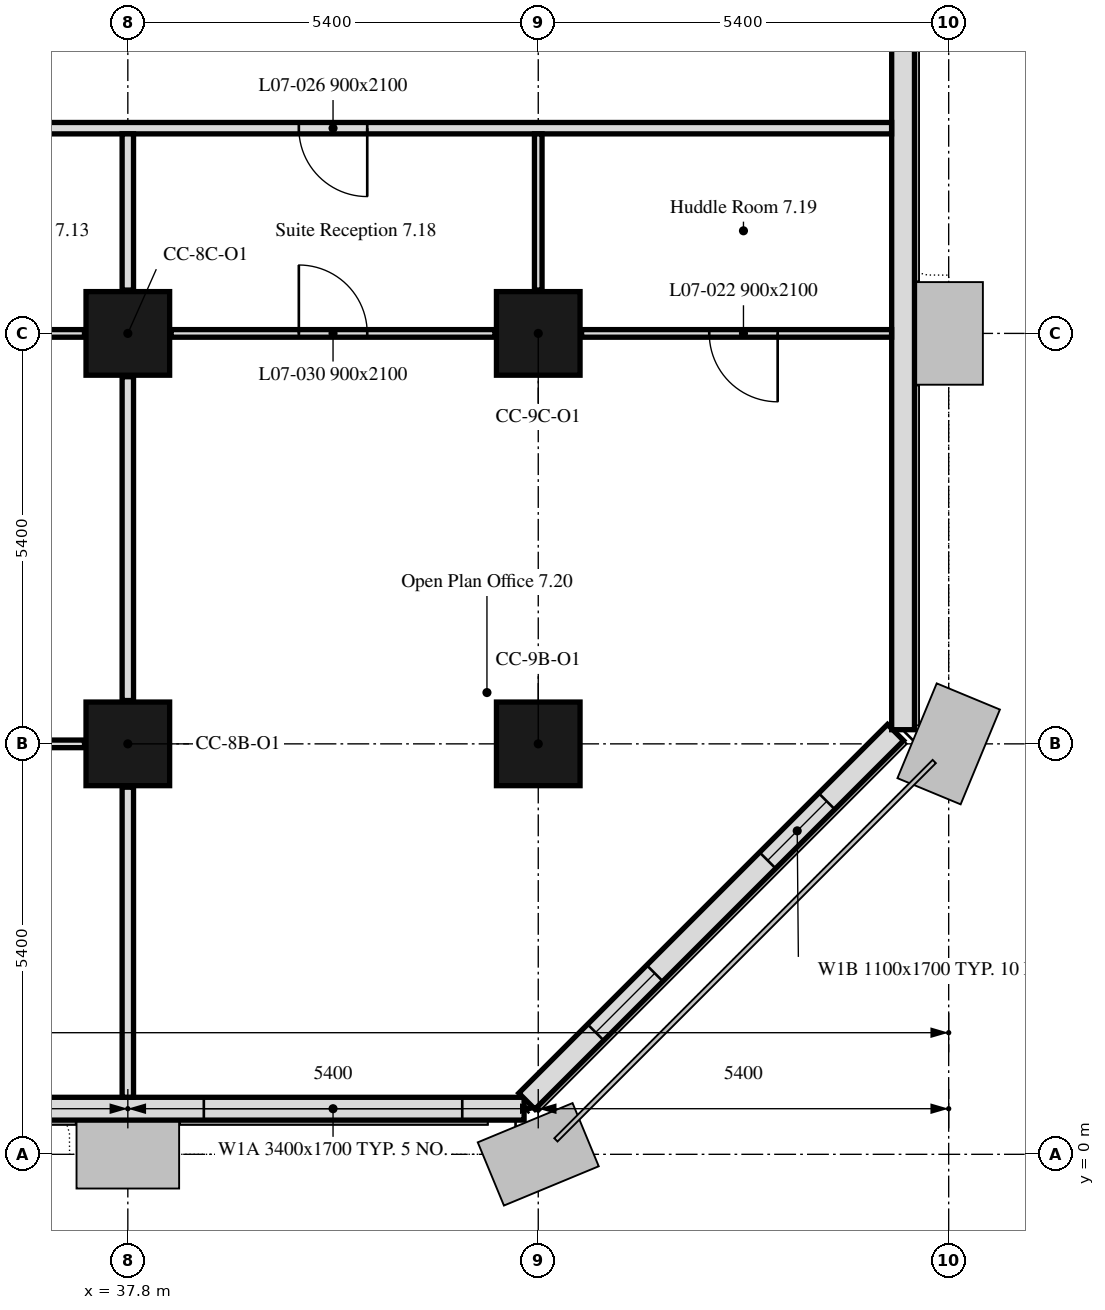
"""IFC4 building model, lengths in metres.
Left out: names, types, materials, properties, quantities, classifications, styles, units other than length and angle.
Written with IfcOpenShell. Run it as: python <this file> out.ifc"""

import sys

from ifc_helpers import new_model, si_unit, direction, frame, frame_2d, origin, origin_2d, place, context, subcontext, project, spatial, rectangle, extrude, element, fill, save


model = new_model("IFC4")
c1 = context("Model", 3, precision=1e-05, world=origin(), true_north=direction((0.0, 1.0)))
c2 = subcontext(c1, "Body", "Model", "MODEL_VIEW")
j1 = project(units=[si_unit("LENGTHUNIT", "METRE"), si_unit("PLANEANGLEUNIT", "RADIAN")], contexts=[c1])
p1 = place(None, origin())
s1 = spatial("IfcSite", under=j1, at=p1, CompositionType="ELEMENT")
p2 = place(p1, origin())
s2 = spatial("IfcBuilding", under=s1, at=p2, CompositionType="ELEMENT")
p3 = place(p2, frame((0.0, 0.0, 37.4)))
s3 = spatial("IfcBuildingStorey", under=s2, at=p3, CompositionType="ELEMENT", Elevation=37.4)
for number, where, z_axis, x_axis in (
    (1, (37.8, 5.4, 0.0), (0.0, 0.0, 1.0), (1.0, 0.0, 0.0)),
    (2, (43.2, 5.4, 0.0), (0.0, 0.0, 1.0), (1.0, 0.0, 0.0)),
    (3, (37.8, 10.8, 0.0), (0.0, 0.0, 1.0), (1.0, 0.0, 0.0)),
    (4, (43.2, 10.8, 0.0), (0.0, 0.0, 1.0), (1.0, 0.0, 0.0)),
):
    element("IfcColumn", number, at=place(p3, frame(where, z_axis=z_axis, x_axis=x_axis)), inside=s3, PredefinedType="COLUMN", context=c2, shape_type="SweptSolid", body=[
        extrude(rectangle(XDim=1.1, YDim=1.1, at=origin_2d()), origin(), (0.0, 0.0, 1.0), 3.5),
    ])
p4 = place(p3, frame((10.986, 0.6, 0.0), z_axis=(0.0, 0.0, 1.0), x_axis=(1.0, 0.0, 0.0)))
e5 = element("IfcWall", 5, at=p4, inside=s3, PredefinedType="SOLIDWALL", context=c2, shape_type="SweptSolid", body=[
    extrude(rectangle(XDim=32.027, YDim=0.3, at=frame_2d((16.014, 0.0))), origin(), (0.0, 0.0, 1.0), 3.5),
])
p5 = place(p4, frame((27.814, 0.0, 0.9)))
e6 = element("IfcOpeningElement", 6, at=p5, cuts=e5, PredefinedType="OPENING", context=c2, shape_type="SweptSolid", body=[
    extrude(rectangle(XDim=3.4, YDim=1.7, at=frame_2d((1.7, 0.85))), frame((0.0, 0.16, 0.0), z_axis=(0.0, -1.0, 0.0), x_axis=(1.0, 0.0, 0.0)), (0.0, 0.0, 1.0), 0.32),
])
p6 = place(p3, frame((43.051, 0.699, 0.0), z_axis=(0.0, 0.0, 1.0), x_axis=(0.707106781187, 0.707106781187, 0.0)))
e7 = element("IfcWall", 7, at=p6, inside=s3, PredefinedType="SOLIDWALL", context=c2, shape_type="SweptSolid", body=[
    extrude(rectangle(XDim=6.86, YDim=0.3, at=frame_2d((3.43, 0.0))), origin(), (0.0, 0.0, 1.0), 3.5),
])
p7 = place(p6, frame((1.28, 0.0, 0.9)))
e8 = element("IfcOpeningElement", 8, at=p7, cuts=e7, PredefinedType="OPENING", context=c2, shape_type="SweptSolid", body=[
    extrude(rectangle(XDim=1.1, YDim=1.7, at=frame_2d((0.55, 0.85))), frame((0.0, 0.16, 0.0), z_axis=(0.0, -1.0, 0.0), x_axis=(1.0, 0.0, 0.0)), (0.0, 0.0, 1.0), 0.32),
])
p8 = place(p6, frame((4.48, 0.0, 0.9)))
e9 = element("IfcOpeningElement", 9, at=p8, cuts=e7, PredefinedType="OPENING", context=c2, shape_type="SweptSolid", body=[
    extrude(rectangle(XDim=1.1, YDim=1.7, at=frame_2d((0.55, 0.85))), frame((0.0, 0.16, 0.0), z_axis=(0.0, -1.0, 0.0), x_axis=(1.0, 0.0, 0.0)), (0.0, 0.0, 1.0), 0.32),
])
p9 = place(p3, frame((48.0, 5.586, 0.0), z_axis=(0.0, 0.0, 1.0), x_axis=(0.0, 1.0, 0.0)))
e10 = element("IfcWall", 10, at=p9, inside=s3, PredefinedType="SOLIDWALL", context=c2, shape_type="SweptSolid", body=[
    extrude(rectangle(XDim=32.027, YDim=0.3, at=frame_2d((16.014, 0.0))), origin(), (0.0, 0.0, 1.0), 3.5),
])
p10 = place(p9, frame((28.164, 0.0, 0.9)))
e11 = element("IfcOpeningElement", 11, at=p10, cuts=e10, PredefinedType="OPENING", context=c2, shape_type="SweptSolid", body=[
    extrude(rectangle(XDim=1.1, YDim=1.7, at=frame_2d((0.55, 0.85))), frame((0.0, 0.16, 0.0), z_axis=(0.0, -1.0, 0.0), x_axis=(1.0, 0.0, 0.0)), (0.0, 0.0, 1.0), 0.32),
])
p11 = place(p9, frame((29.764, 0.0, 0.9)))
e12 = element("IfcOpeningElement", 12, at=p11, cuts=e10, PredefinedType="OPENING", context=c2, shape_type="SweptSolid", body=[
    extrude(rectangle(XDim=1.1, YDim=1.7, at=frame_2d((0.55, 0.85))), frame((0.0, 0.16, 0.0), z_axis=(0.0, -1.0, 0.0), x_axis=(1.0, 0.0, 0.0)), (0.0, 0.0, 1.0), 0.32),
])
p12 = place(p3, frame((47.849, 13.5, 0.0), z_axis=(0.0, 0.0, 1.0), x_axis=(-1.0, 0.0, 0.0)))
e13 = element("IfcWall", 13, at=p12, inside=s3, PredefinedType="PARTITIONING", context=c2, shape_type="SweptSolid", body=[
    extrude(rectangle(XDim=41.698, YDim=0.15, at=frame_2d((20.849, 0.0))), origin(), (0.0, 0.0, 1.0), 2.75),
])
p13 = place(p12, frame((29.119, 0.0, 0.0)))
e14 = element("IfcOpeningElement", 14, at=p13, cuts=e13, PredefinedType="OPENING", context=c2, shape_type="SweptSolid", body=[
    extrude(rectangle(XDim=0.9, YDim=2.1, at=frame_2d((0.45, 1.05))), frame((0.0, 0.075, 0.0), z_axis=(0.0, -1.0, 0.0), x_axis=(1.0, 0.0, 0.0)), (0.0, 0.0, 1.0), 0.15),
])
p14 = place(p12, frame((27.879, 0.0, 0.0)))
e15 = element("IfcOpeningElement", 15, at=p14, cuts=e13, PredefinedType="OPENING", context=c2, shape_type="SweptSolid", body=[
    extrude(rectangle(XDim=0.9, YDim=2.1, at=frame_2d((0.45, 1.05))), frame((0.0, 0.075, 0.0), z_axis=(0.0, -1.0, 0.0), x_axis=(1.0, 0.0, 0.0)), (0.0, 0.0, 1.0), 0.15),
])
p15 = place(p12, frame((18.319, 0.0, 0.0)))
e16 = element("IfcOpeningElement", 16, at=p15, cuts=e13, PredefinedType="OPENING", context=c2, shape_type="SweptSolid", body=[
    extrude(rectangle(XDim=0.9, YDim=2.1, at=frame_2d((0.45, 1.05))), frame((0.0, 0.075, 0.0), z_axis=(0.0, -1.0, 0.0), x_axis=(1.0, 0.0, 0.0)), (0.0, 0.0, 1.0), 0.15),
])
p16 = place(p12, frame((11.679, 0.0, 0.0)))
e17 = element("IfcOpeningElement", 17, at=p16, cuts=e13, PredefinedType="OPENING", context=c2, shape_type="SweptSolid", body=[
    extrude(rectangle(XDim=0.9, YDim=2.1, at=frame_2d((0.45, 1.05))), frame((0.0, 0.075, 0.0), z_axis=(0.0, -1.0, 0.0), x_axis=(1.0, 0.0, 0.0)), (0.0, 0.0, 1.0), 0.15),
])
p17 = place(p12, frame((38.624, 0.0, 0.0)))
e18 = element("IfcOpeningElement", 18, at=p17, cuts=e13, PredefinedType="OPENING", context=c2, shape_type="SweptSolid", body=[
    extrude(rectangle(XDim=0.9, YDim=2.1, at=frame_2d((0.45, 1.05))), frame((0.0, 0.075, 0.0), z_axis=(0.0, -1.0, 0.0), x_axis=(1.0, 0.0, 0.0)), (0.0, 0.0, 1.0), 0.15),
])
p18 = place(p12, frame((23.099, 0.0, 0.0)))
e19 = element("IfcOpeningElement", 19, at=p18, cuts=e13, PredefinedType="OPENING", context=c2, shape_type="SweptSolid", body=[
    extrude(rectangle(XDim=0.9, YDim=2.1, at=frame_2d((0.45, 1.05))), frame((0.0, 0.075, 0.0), z_axis=(0.0, -1.0, 0.0), x_axis=(1.0, 0.0, 0.0)), (0.0, 0.0, 1.0), 0.15),
])
p19 = place(p12, frame((6.899, 0.0, 0.0)))
e20 = element("IfcOpeningElement", 20, at=p19, cuts=e13, PredefinedType="OPENING", context=c2, shape_type="SweptSolid", body=[
    extrude(rectangle(XDim=0.9, YDim=2.1, at=frame_2d((0.45, 1.05))), frame((0.0, 0.075, 0.0), z_axis=(0.0, -1.0, 0.0), x_axis=(1.0, 0.0, 0.0)), (0.0, 0.0, 1.0), 0.15),
])
p20 = place(p3, frame((32.97, 10.8, 0.0), z_axis=(0.0, 0.0, 1.0), x_axis=(1.0, 0.0, 0.0)))
e21 = element("IfcWall", 21, at=p20, inside=s3, PredefinedType="PARTITIONING", context=c2, shape_type="SweptSolid", body=[
    extrude(rectangle(XDim=4.26, YDim=0.1, at=frame_2d((2.13, 0.0))), origin(), (0.0, 0.0, 1.0), 2.75),
])
p21 = place(p20, frame((1.06, 0.0, 0.0)))
e22 = element("IfcOpeningElement", 22, at=p21, cuts=e21, PredefinedType="OPENING", context=c2, shape_type="SweptSolid", body=[
    extrude(rectangle(XDim=0.9, YDim=2.1, at=frame_2d((0.45, 1.05))), frame((0.0, 0.05, 0.0), z_axis=(0.0, -1.0, 0.0), x_axis=(1.0, 0.0, 0.0)), (0.0, 0.0, 1.0), 0.1),
])
p22 = place(p3, frame((37.8, 11.37, 0.0), z_axis=(0.0, 0.0, 1.0), x_axis=(0.0, 1.0, 0.0)))
e23 = element("IfcWall", 23, at=p22, inside=s3, PredefinedType="PARTITIONING", context=c2, shape_type="SweptSolid", body=[
    extrude(rectangle(XDim=2.055, YDim=0.15, at=frame_2d((1.027, 0.0))), origin(), (0.0, 0.0, 1.0), 2.75),
])
p23 = place(p3, frame((32.97, 5.4, 0.0), z_axis=(0.0, 0.0, 1.0), x_axis=(1.0, 0.0, 0.0)))
e24 = element("IfcWall", 24, at=p23, inside=s3, PredefinedType="PARTITIONING", context=c2, shape_type="SweptSolid", body=[
    extrude(rectangle(XDim=4.26, YDim=0.1, at=frame_2d((2.13, 0.0))), origin(), (0.0, 0.0, 1.0), 3.5),
])
p24 = place(p23, frame((1.68, 0.0, 0.0)))
e25 = element("IfcOpeningElement", 25, at=p24, cuts=e24, PredefinedType="OPENING", context=c2, shape_type="SweptSolid", body=[
    extrude(rectangle(XDim=0.9, YDim=2.1, at=frame_2d((0.45, 1.05))), frame((0.0, 0.05, 0.0), z_axis=(0.0, -1.0, 0.0), x_axis=(1.0, 0.0, 0.0)), (0.0, 0.0, 1.0), 0.1),
])
p25 = place(p3, frame((37.8, 5.97, 0.0), z_axis=(0.0, 0.0, 1.0), x_axis=(0.0, 1.0, 0.0)))
e26 = element("IfcWall", 26, at=p25, inside=s3, PredefinedType="PARTITIONING", context=c2, shape_type="SweptSolid", body=[
    extrude(rectangle(XDim=4.26, YDim=0.15, at=frame_2d((2.13, 0.0))), origin(), (0.0, 0.0, 1.0), 2.75),
])
p26 = place(p3, frame((37.8, 4.83, 0.0), z_axis=(0.0, 0.0, 1.0), x_axis=(0.0, -1.0, 0.0)))
e27 = element("IfcWall", 27, at=p26, inside=s3, PredefinedType="PARTITIONING", context=c2, shape_type="SweptSolid", body=[
    extrude(rectangle(XDim=4.079, YDim=0.15, at=frame_2d((2.04, 0.0))), origin(), (0.0, 0.0, 1.0), 2.75),
])
p27 = place(p3, frame((38.37, 10.8, 0.0), z_axis=(0.0, 0.0, 1.0), x_axis=(1.0, 0.0, 0.0)))
e28 = element("IfcWall", 28, at=p27, inside=s3, PredefinedType="PARTITIONING", context=c2, shape_type="SweptSolid", body=[
    extrude(rectangle(XDim=4.26, YDim=0.1, at=frame_2d((2.13, 0.0))), origin(), (0.0, 0.0, 1.0), 2.75),
])
p28 = place(p27, frame((1.68, 0.0, 0.0)))
e29 = element("IfcOpeningElement", 29, at=p28, cuts=e28, PredefinedType="OPENING", context=c2, shape_type="SweptSolid", body=[
    extrude(rectangle(XDim=0.9, YDim=2.1, at=frame_2d((0.45, 1.05))), frame((0.0, 0.05, 0.0), z_axis=(0.0, -1.0, 0.0), x_axis=(1.0, 0.0, 0.0)), (0.0, 0.0, 1.0), 0.1),
])
p29 = place(p3, frame((43.2, 11.37, 0.0), z_axis=(0.0, 0.0, 1.0), x_axis=(0.0, 1.0, 0.0)))
e30 = element("IfcWall", 30, at=p29, inside=s3, PredefinedType="PARTITIONING", context=c2, shape_type="SweptSolid", body=[
    extrude(rectangle(XDim=2.055, YDim=0.1, at=frame_2d((1.027, 0.0))), origin(), (0.0, 0.0, 1.0), 3.5),
])
p30 = place(p3, frame((47.849, 10.8, 0.0), z_axis=(0.0, 0.0, 1.0), x_axis=(-1.0, 0.0, 0.0)))
e31 = element("IfcWall", 31, at=p30, inside=s3, PredefinedType="PARTITIONING", context=c2, shape_type="SweptSolid", body=[
    extrude(rectangle(XDim=4.079, YDim=0.1, at=frame_2d((2.04, 0.0))), origin(), (0.0, 0.0, 1.0), 2.75),
])
p31 = place(p30, frame((1.499, 0.0, 0.0)))
e32 = element("IfcOpeningElement", 32, at=p31, cuts=e31, PredefinedType="OPENING", context=c2, shape_type="SweptSolid", body=[
    extrude(rectangle(XDim=0.9, YDim=2.1, at=frame_2d((0.45, 1.05))), frame((0.0, 0.05, 0.0), z_axis=(0.0, -1.0, 0.0), x_axis=(1.0, 0.0, 0.0)), (0.0, 0.0, 1.0), 0.1),
])
p32 = place(p5, origin())
e33 = element("IfcWindow", 33, at=p32, inside=s3, PartitioningType="SINGLE_PANEL", PredefinedType="WINDOW", context=c2, shape_type="SweptSolid", body=[
    extrude(rectangle(XDim=3.4, YDim=1.7, at=frame_2d((1.7, 0.85))), frame((0.0, 0.03, 0.0), z_axis=(0.0, -1.0, 0.0), x_axis=(1.0, 0.0, 0.0)), (0.0, 0.0, 1.0), 0.06),
])
fill(e6, e33)
p33 = place(p7, origin())
e34 = element("IfcWindow", 34, at=p33, inside=s3, PartitioningType="SINGLE_PANEL", PredefinedType="WINDOW", context=c2, shape_type="SweptSolid", body=[
    extrude(rectangle(XDim=1.1, YDim=1.7, at=frame_2d((0.55, 0.85))), frame((0.0, 0.03, 0.0), z_axis=(0.0, -1.0, 0.0), x_axis=(1.0, 0.0, 0.0)), (0.0, 0.0, 1.0), 0.06),
])
fill(e8, e34)
p34 = place(p8, origin())
e35 = element("IfcWindow", 35, at=p34, inside=s3, PartitioningType="SINGLE_PANEL", PredefinedType="WINDOW", context=c2, shape_type="SweptSolid", body=[
    extrude(rectangle(XDim=1.1, YDim=1.7, at=frame_2d((0.55, 0.85))), frame((0.0, 0.03, 0.0), z_axis=(0.0, -1.0, 0.0), x_axis=(1.0, 0.0, 0.0)), (0.0, 0.0, 1.0), 0.06),
])
fill(e9, e35)
p35 = place(p31, origin())
e36 = element("IfcDoor", 36, at=p35, inside=s3, OperationType="SINGLE_SWING_RIGHT", PredefinedType="DOOR", context=c2, shape_type="SweptSolid", body=[
    extrude(rectangle(XDim=0.9, YDim=2.1, at=frame_2d((0.45, 1.05))), frame((0.0, 0.025, 0.0), z_axis=(0.0, -1.0, 0.0), x_axis=(1.0, 0.0, 0.0)), (0.0, 0.0, 1.0), 0.05),
])
fill(e32, e36)
p36 = place(p19, origin())
e37 = element("IfcDoor", 37, at=p36, inside=s3, OperationType="SINGLE_SWING_RIGHT", PredefinedType="DOOR", context=c2, shape_type="SweptSolid", body=[
    extrude(rectangle(XDim=0.9, YDim=2.1, at=frame_2d((0.45, 1.05))), frame((0.0, 0.025, 0.0), z_axis=(0.0, -1.0, 0.0), x_axis=(1.0, 0.0, 0.0)), (0.0, 0.0, 1.0), 0.05),
])
fill(e20, e37)
p37 = place(p28, origin())
e38 = element("IfcDoor", 38, at=p37, inside=s3, OperationType="SINGLE_SWING_LEFT", PredefinedType="DOOR", context=c2, shape_type="SweptSolid", body=[
    extrude(rectangle(XDim=0.9, YDim=2.1, at=frame_2d((0.45, 1.05))), frame((0.0, 0.025, 0.0), z_axis=(0.0, -1.0, 0.0), x_axis=(1.0, 0.0, 0.0)), (0.0, 0.0, 1.0), 0.05),
])
fill(e29, e38)
save(model, sys.argv[1])
